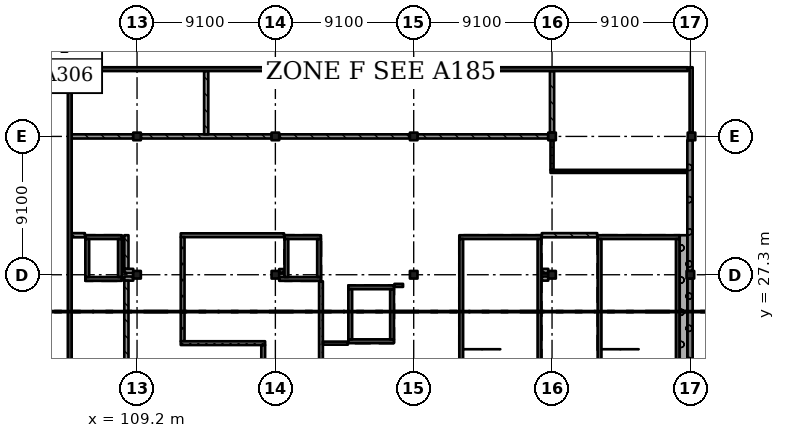
"""IFC4 building model, lengths in metres.
Left out: names, types, materials, properties, quantities, classifications, styles, units other than length and angle.
Written with IfcOpenShell. Run it as: python <this file> out.ifc"""

import sys

from ifc_helpers import new_model, si_unit, direction, frame, frame_2d, origin, origin_2d, place, context, subcontext, project, spatial, rectangle, extrude, element, fill, save


model = new_model("IFC4")
c1 = context("Model", 3, precision=1e-05, world=origin(), true_north=direction((0.0, 1.0)))
c2 = subcontext(c1, "Body", "Model", "MODEL_VIEW")
j1 = project(units=[si_unit("LENGTHUNIT", "METRE"), si_unit("PLANEANGLEUNIT", "RADIAN")], contexts=[c1])
p1 = place(None, origin())
s1 = spatial("IfcSite", under=j1, at=p1, CompositionType="ELEMENT")
p2 = place(p1, origin())
s2 = spatial("IfcBuilding", under=s1, at=p2, CompositionType="ELEMENT")
p3 = place(p2, frame((0.0, 0.0, 29.12)))
s3 = spatial("IfcBuildingStorey", under=s2, at=p3, CompositionType="ELEMENT", Elevation=29.12)
for number, where, z_axis, x_axis in (
    (1, (109.2, 27.3, 0.0), (0.0, 0.0, 1.0), (1.0, 0.0, 0.0)),
    (2, (109.2, 36.4, 0.0), (0.0, 0.0, 1.0), (1.0, 0.0, 0.0)),
    (3, (118.3, 27.3, 0.0), (0.0, 0.0, 1.0), (1.0, 0.0, 0.0)),
    (4, (118.3, 36.4, 0.0), (0.0, 0.0, 1.0), (1.0, 0.0, 0.0)),
    (5, (127.4, 27.3, 0.0), (0.0, 0.0, 1.0), (1.0, 0.0, 0.0)),
    (6, (127.4, 36.4, 0.0), (0.0, 0.0, 1.0), (1.0, 0.0, 0.0)),
    (7, (136.5, 27.3, 0.0), (0.0, 0.0, 1.0), (1.0, 0.0, 0.0)),
    (8, (136.5, 36.4, 0.0), (0.0, 0.0, 1.0), (1.0, 0.0, 0.0)),
    (9, (145.6, 27.3, 0.0), (0.0, 0.0, 1.0), (1.0, 0.0, 0.0)),
    (10, (145.675, 36.4, 0.0), (0.0, 0.0, 1.0), (1.0, 0.0, 0.0)),
):
    element("IfcColumn", number, at=place(p3, frame(where, z_axis=z_axis, x_axis=x_axis)), inside=s3, PredefinedType="COLUMN", context=c2, shape_type="SweptSolid", body=[
        extrude(rectangle(XDim=0.5, YDim=0.5, at=origin_2d()), origin(), (0.0, 0.0, 1.0), 4.55),
    ])
p4 = place(p3, frame((104.775, 40.95, 0.0), z_axis=(0.0, 0.0, 1.0), x_axis=(0.0, -1.0, 0.0)))
e11 = element("IfcWall", 11, at=p4, inside=s3, PredefinedType="SHEAR", context=c2, shape_type="SweptSolid", body=[
    extrude(rectangle(XDim=40.775, YDim=0.25, at=frame_2d((20.387, 0.0))), origin(), (0.0, 0.0, 1.0), 4.55),
])
p5 = place(p3, frame((104.65, 40.825, 0.0), z_axis=(0.0, 0.0, 1.0), x_axis=(1.0, 0.0, 0.0)))
e12 = element("IfcWall", 12, at=p5, inside=s3, PredefinedType="SHEAR", context=c2, shape_type="SweptSolid", body=[
    extrude(rectangle(XDim=40.775, YDim=0.25, at=frame_2d((20.388, 0.0))), origin(), (0.0, 0.0, 1.0), 4.55),
])
p6 = place(p3, frame((108.2, 27.025, 0.0), z_axis=(0.0, 0.0, 1.0), x_axis=(-1.0, 0.0, 0.0)))
e13 = element("IfcWall", 13, at=p6, inside=s3, PredefinedType="SHEAR", context=c2, shape_type="SweptSolid", body=[
    extrude(rectangle(XDim=2.4, YDim=0.25, at=frame_2d((1.2, 0.0))), origin(), (0.0, 0.0, 1.0), 4.55),
])
p7 = place(p6, frame((0.75, 0.0, 0.0)))
e14 = element("IfcOpeningElement", 14, at=p7, cuts=e13, PredefinedType="OPENING", context=c2, shape_type="SweptSolid", body=[
    extrude(rectangle(XDim=0.9, YDim=2.1, at=frame_2d((0.45, 1.05))), frame((0.0, 0.135, 0.0), z_axis=(0.0, -1.0, 0.0), x_axis=(1.0, 0.0, 0.0)), (0.0, 0.0, 1.0), 0.27),
])
p8 = place(p3, frame((108.2, 29.775, 0.0), z_axis=(0.0, 0.0, 1.0), x_axis=(-1.0, 0.0, 0.0)))
e15 = element("IfcWall", 15, at=p8, inside=s3, PredefinedType="SHEAR", context=c2, shape_type="SweptSolid", body=[
    extrude(rectangle(XDim=2.4, YDim=0.25, at=frame_2d((1.2, 0.0))), origin(), (0.0, 0.0, 1.0), 4.55),
])
for number, where, z_axis, x_axis in (
    (16, (105.925, 29.65, 0.0), (0.0, 0.0, 1.0), (0.0, -1.0, 0.0)),
    (17, (108.075, 29.65, 0.0), (0.0, 0.0, 1.0), (0.0, -1.0, 0.0)),
):
    element("IfcWall", number, at=place(p3, frame(where, z_axis=z_axis, x_axis=x_axis)), inside=s3, PredefinedType="SHEAR", context=c2, shape_type="SweptSolid", body=[
        extrude(rectangle(XDim=2.5, YDim=0.25, at=frame_2d((1.25, 0.0))), origin(), (0.0, 0.0, 1.0), 4.55),
    ])
p9 = place(p3, frame((121.3, 27.025, 0.0), z_axis=(0.0, 0.0, 1.0), x_axis=(-1.0, 0.0, 0.0)))
e18 = element("IfcWall", 18, at=p9, inside=s3, PredefinedType="SHEAR", context=c2, shape_type="SweptSolid", body=[
    extrude(rectangle(XDim=2.75, YDim=0.25, at=frame_2d((1.375, 0.0))), origin(), (0.0, 0.0, 1.0), 4.55),
])
p10 = place(p3, frame((121.3, 29.775, 0.0), z_axis=(0.0, 0.0, 1.0), x_axis=(-1.0, 0.0, 0.0)))
e19 = element("IfcWall", 19, at=p10, inside=s3, PredefinedType="SHEAR", context=c2, shape_type="SweptSolid", body=[
    extrude(rectangle(XDim=2.4, YDim=0.25, at=frame_2d((1.2, 0.0))), origin(), (0.0, 0.0, 1.0), 4.55),
])
p11 = place(p3, frame((119.025, 29.65, 0.0), z_axis=(0.0, 0.0, 1.0), x_axis=(0.0, -1.0, 0.0)))
e20 = element("IfcWall", 20, at=p11, inside=s3, PredefinedType="SHEAR", context=c2, shape_type="SweptSolid", body=[
    extrude(rectangle(XDim=2.5, YDim=0.25, at=frame_2d((1.25, 0.0))), origin(), (0.0, 0.0, 1.0), 4.55),
])
p12 = place(p3, frame((121.175, 29.65, 0.0), z_axis=(0.0, 0.0, 1.0), x_axis=(0.0, -1.0, 0.0)))
e21 = element("IfcWall", 21, at=p12, inside=s3, PredefinedType="SHEAR", context=c2, shape_type="SweptSolid", body=[
    extrude(rectangle(XDim=2.5, YDim=0.25, at=frame_2d((1.25, 0.0))), origin(), (0.0, 0.0, 1.0), 4.55),
])
p13 = place(p12, frame((0.9, 0.0, 0.0)))
e22 = element("IfcOpeningElement", 22, at=p13, cuts=e21, PredefinedType="OPENING", context=c2, shape_type="SweptSolid", body=[
    extrude(rectangle(XDim=0.7, YDim=2.1, at=frame_2d((0.35, 1.05))), frame((0.0, 0.135, 0.0), z_axis=(0.0, -1.0, 0.0), x_axis=(1.0, 0.0, 0.0)), (0.0, 0.0, 1.0), 0.27),
])
p14 = place(p3, frame((126.1, 22.925, 0.0), z_axis=(0.0, 0.0, 1.0), x_axis=(-1.0, 0.0, 0.0)))
e23 = element("IfcWall", 23, at=p14, inside=s3, PredefinedType="SHEAR", context=c2, shape_type="SweptSolid", body=[
    extrude(rectangle(XDim=3.0, YDim=0.25, at=frame_2d((1.5, 0.0))), origin(), (0.0, 0.0, 1.0), 4.55),
])
p15 = place(p14, frame((0.95, 0.0, 0.0)))
e24 = element("IfcOpeningElement", 24, at=p15, cuts=e23, PredefinedType="OPENING", context=c2, shape_type="SweptSolid", body=[
    extrude(rectangle(XDim=1.1, YDim=2.1, at=frame_2d((0.55, 1.05))), frame((0.0, 0.135, 0.0), z_axis=(0.0, -1.0, 0.0), x_axis=(1.0, 0.0, 0.0)), (0.0, 0.0, 1.0), 0.27),
])
p16 = place(p3, frame((126.1, 26.475, 0.0), z_axis=(0.0, 0.0, 1.0), x_axis=(-1.0, 0.0, 0.0)))
e25 = element("IfcWall", 25, at=p16, inside=s3, PredefinedType="SHEAR", context=c2, shape_type="SweptSolid", body=[
    extrude(rectangle(XDim=3.0, YDim=0.25, at=frame_2d((1.5, 0.0))), origin(), (0.0, 0.0, 1.0), 4.55),
])
for number, where, z_axis, x_axis in (
    (26, (123.225, 26.35, 0.0), (0.0, 0.0, 1.0), (0.0, -1.0, 0.0)),
    (27, (125.975, 26.35, 0.0), (0.0, 0.0, 1.0), (0.0, -1.0, 0.0)),
):
    element("IfcWall", number, at=place(p3, frame(where, z_axis=z_axis, x_axis=x_axis)), inside=s3, PredefinedType="SHEAR", context=c2, shape_type="SweptSolid", body=[
        extrude(rectangle(XDim=3.3, YDim=0.25, at=frame_2d((1.65, 0.0))), origin(), (0.0, 0.0, 1.0), 4.55),
    ])
p17 = place(p3, frame((144.9, 29.775, 0.0), z_axis=(0.0, 0.0, 1.0), x_axis=(-1.0, 0.0, 0.0)))
e28 = element("IfcWall", 28, at=p17, inside=s3, PredefinedType="SHEAR", context=c2, shape_type="SweptSolid", body=[
    extrude(rectangle(XDim=5.4, YDim=0.25, at=frame_2d((2.7, 0.0))), origin(), (0.0, 0.0, 1.0), 4.55),
])
for number, where, z_axis, x_axis in (
    (29, (139.625, 29.65, 0.0), (0.0, 0.0, 1.0), (0.0, -1.0, 0.0)),
    (30, (144.775, 29.65, 0.0), (0.0, 0.0, 1.0), (0.0, -1.0, 0.0)),
):
    element("IfcWall", number, at=place(p3, frame(where, z_axis=z_axis, x_axis=x_axis)), inside=s3, PredefinedType="SHEAR", context=c2, shape_type="SweptSolid", body=[
        extrude(rectangle(XDim=9.6, YDim=0.25, at=frame_2d((4.8, 0.0))), origin(), (0.0, 0.0, 1.0), 4.55),
    ])
p18 = place(p3, frame((135.8, 29.775, 0.0), z_axis=(0.0, 0.0, 1.0), x_axis=(-1.0, 0.0, 0.0)))
e31 = element("IfcWall", 31, at=p18, inside=s3, PredefinedType="SHEAR", context=c2, shape_type="SweptSolid", body=[
    extrude(rectangle(XDim=5.4, YDim=0.25, at=frame_2d((2.7, 0.0))), origin(), (0.0, 0.0, 1.0), 4.55),
])
for number, where, z_axis, x_axis in (
    (32, (130.525, 29.65, 0.0), (0.0, 0.0, 1.0), (0.0, -1.0, 0.0)),
    (33, (135.675, 29.65, 0.0), (0.0, 0.0, 1.0), (0.0, -1.0, 0.0)),
):
    element("IfcWall", number, at=place(p3, frame(where, z_axis=z_axis, x_axis=x_axis)), inside=s3, PredefinedType="SHEAR", context=c2, shape_type="SweptSolid", body=[
        extrude(rectangle(XDim=9.6, YDim=0.25, at=frame_2d((4.8, 0.0))), origin(), (0.0, 0.0, 1.0), 4.55),
    ])
p19 = place(p3, frame((145.575, 18.45, 0.0), z_axis=(0.0, 0.0, 1.0), x_axis=(0.0, 1.0, 0.0)))
e34 = element("IfcWall", 34, at=p19, inside=s3, PredefinedType="SOLIDWALL", context=c2, shape_type="SweptSolid", body=[
    extrude(rectangle(XDim=8.6, YDim=0.35, at=frame_2d((4.3, 0.0))), origin(), (0.0, 0.0, 1.0), 4.5),
])
p20 = place(p3, frame((145.575, 27.55, 0.0), z_axis=(0.0, 0.0, 1.0), x_axis=(0.0, 1.0, 0.0)))
e35 = element("IfcWall", 35, at=p20, inside=s3, PredefinedType="SOLIDWALL", context=c2, shape_type="SweptSolid", body=[
    extrude(rectangle(XDim=8.6, YDim=0.35, at=frame_2d((4.3, 0.0))), origin(), (0.0, 0.0, 1.0), 4.5),
])
p21 = place(p3, frame((145.65, 36.65, 0.0), z_axis=(0.0, 0.0, 1.0), x_axis=(0.0, 1.0, 0.0)))
e36 = element("IfcWall", 36, at=p21, inside=s3, PredefinedType="SOLIDWALL", context=c2, shape_type="SweptSolid", body=[
    extrude(rectangle(XDim=4.3, YDim=0.2, at=frame_2d((2.15, 0.0))), origin(), (0.0, 0.0, 1.0), 4.5),
])
p22 = place(p21, frame((0.65, 0.0, 0.6)))
e37 = element("IfcOpeningElement", 37, at=p22, cuts=e36, PredefinedType="OPENING", context=c2, shape_type="SweptSolid", body=[
    extrude(rectangle(XDim=3.0, YDim=3.0, at=frame_2d((1.5, 1.5))), frame((0.0, 0.11, 0.0), z_axis=(0.0, -1.0, 0.0), x_axis=(1.0, 0.0, 0.0)), (0.0, 0.0, 1.0), 0.22),
])
p23 = place(p3, frame((145.15, 19.8, 0.0), z_axis=(0.0, 0.0, 1.0), x_axis=(0.0, 1.0, 0.0)))
e38 = element("IfcWall", 38, at=p23, inside=s3, PredefinedType="SOLIDWALL", context=c2, shape_type="SweptSolid", body=[
    extrude(rectangle(XDim=10.1, YDim=0.5, at=frame_2d((5.05, 0.0))), origin(), (0.0, 0.0, 1.0), 4.55),
])
p24 = place(p3, frame((104.9, 29.9, 0.0), z_axis=(0.0, 0.0, 1.0), x_axis=(1.0, 0.0, 0.0)))
e39 = element("IfcWall", 39, at=p24, inside=s3, PredefinedType="SOLIDWALL", context=c2, shape_type="SweptSolid", body=[
    extrude(rectangle(XDim=0.87, YDim=0.275, at=frame_2d((0.435, 0.0))), origin(), (0.0, 0.0, 1.0), 3.88),
])
p25 = place(p3, frame((108.363, 27.05, 0.0), z_axis=(0.0, 0.0, 1.0), x_axis=(1.0, 0.0, 0.0)))
e40 = element("IfcWall", 40, at=p25, inside=s3, PredefinedType="SOLIDWALL", context=c2, shape_type="SweptSolid", body=[
    extrude(rectangle(XDim=0.587, YDim=0.275, at=frame_2d((0.294, 0.0))), origin(), (0.0, 0.0, 1.0), 3.88),
])
p26 = place(p3, frame((108.5, 19.938, 0.0), z_axis=(0.0, 0.0, 1.0), x_axis=(0.0, 1.0, 0.0)))
e41 = element("IfcWall", 41, at=p26, inside=s3, PredefinedType="SOLIDWALL", context=c2, shape_type="SweptSolid", body=[
    extrude(rectangle(XDim=6.975, YDim=0.275, at=frame_2d((3.488, 0.0))), origin(), (0.0, 0.0, 1.0), 3.88),
])
p27 = place(p3, frame((108.5, 27.688, 0.0), z_axis=(0.0, 0.0, 1.0), x_axis=(0.0, 1.0, 0.0)))
e42 = element("IfcWall", 42, at=p27, inside=s3, PredefinedType="SOLIDWALL", context=c2, shape_type="SweptSolid", body=[
    extrude(rectangle(XDim=2.212, YDim=0.275, at=frame_2d((1.106, 0.0))), origin(), (0.0, 0.0, 1.0), 3.88),
])
p28 = place(p3, frame((108.95, 27.55, 0.0), z_axis=(0.0, 0.0, 1.0), x_axis=(-1.0, 0.0, 0.0)))
e43 = element("IfcWall", 43, at=p28, inside=s3, PredefinedType="SOLIDWALL", context=c2, shape_type="SweptSolid", body=[
    extrude(rectangle(XDim=0.587, YDim=0.275, at=frame_2d((0.294, 0.0))), origin(), (0.0, 0.0, 1.0), 3.88),
])
p29 = place(p3, frame((108.95, 36.4, 0.0), z_axis=(0.0, 0.0, 1.0), x_axis=(-1.0, 0.0, 0.0)))
e44 = element("IfcWall", 44, at=p29, inside=s3, PredefinedType="SOLIDWALL", context=c2, shape_type="SweptSolid", body=[
    extrude(rectangle(XDim=4.05, YDim=0.275, at=frame_2d((2.025, 0.0))), origin(), (0.0, 0.0, 1.0), 3.88),
])
p30 = place(p3, frame((112.075, 29.9, 0.0), z_axis=(0.0, 0.0, 1.0), x_axis=(1.0, 0.0, 0.0)))
e45 = element("IfcWall", 45, at=p30, inside=s3, PredefinedType="SOLIDWALL", context=c2, shape_type="SweptSolid", body=[
    extrude(rectangle(XDim=6.795, YDim=0.25, at=frame_2d((3.397, 0.0))), origin(), (0.0, 0.0, 1.0), 3.88),
])
p31 = place(p3, frame((112.2, 22.925, 0.0), z_axis=(0.0, 0.0, 1.0), x_axis=(0.0, 1.0, 0.0)))
e46 = element("IfcWall", 46, at=p31, inside=s3, PredefinedType="SOLIDWALL", context=c2, shape_type="SweptSolid", body=[
    extrude(rectangle(XDim=6.85, YDim=0.25, at=frame_2d((3.425, 0.0))), origin(), (0.0, 0.0, 1.0), 3.88),
])
p32 = place(p3, frame((109.45, 36.4, 0.0), z_axis=(0.0, 0.0, 1.0), x_axis=(1.0, 0.0, 0.0)))
e47 = element("IfcWall", 47, at=p32, inside=s3, PredefinedType="SOLIDWALL", context=c2, shape_type="SweptSolid", body=[
    extrude(rectangle(XDim=8.6, YDim=0.275, at=frame_2d((4.3, 0.0))), origin(), (0.0, 0.0, 1.0), 3.88),
])
p33 = place(p32, frame((1.55, 0.0, 0.0)))
e48 = element("IfcOpeningElement", 48, at=p33, cuts=e47, PredefinedType="OPENING", context=c2, shape_type="SweptSolid", body=[
    extrude(rectangle(XDim=1.2, YDim=2.4, at=frame_2d((0.6, 1.2))), frame((0.0, 0.147, 0.0), z_axis=(0.0, -1.0, 0.0), x_axis=(1.0, 0.0, 0.0)), (0.0, 0.0, 1.0), 0.295),
])
p34 = place(p3, frame((113.75, 36.538, 0.0), z_axis=(0.0, 0.0, 1.0), x_axis=(0.0, 1.0, 0.0)))
e49 = element("IfcWall", 49, at=p34, inside=s3, PredefinedType="SOLIDWALL", context=c2, shape_type="SweptSolid", body=[
    extrude(rectangle(XDim=4.162, YDim=0.275, at=frame_2d((2.081, 0.0))), origin(), (0.0, 0.0, 1.0), 3.88),
])
p35 = place(p3, frame((117.5, 19.925, 0.0), z_axis=(0.0, 0.0, 1.0), x_axis=(0.0, 1.0, 0.0)))
e50 = element("IfcWall", 50, at=p35, inside=s3, PredefinedType="SOLIDWALL", context=c2, shape_type="SweptSolid", body=[
    extrude(rectangle(XDim=2.75, YDim=0.25, at=frame_2d((1.375, 0.0))), origin(), (0.0, 0.0, 1.0), 3.88),
])
p36 = place(p3, frame((117.625, 22.8, 0.0), z_axis=(0.0, 0.0, 1.0), x_axis=(-1.0, 0.0, 0.0)))
e51 = element("IfcWall", 51, at=p36, inside=s3, PredefinedType="SOLIDWALL", context=c2, shape_type="SweptSolid", body=[
    extrude(rectangle(XDim=5.55, YDim=0.25, at=frame_2d((2.775, 0.0))), origin(), (0.0, 0.0, 1.0), 3.88),
])
p37 = place(p3, frame((118.87, 27.55, 0.0), z_axis=(0.0, 0.0, 1.0), x_axis=(-1.0, 0.0, 0.0)))
e52 = element("IfcWall", 52, at=p37, inside=s3, PredefinedType="SOLIDWALL", context=c2, shape_type="SweptSolid", body=[
    extrude(rectangle(XDim=0.32, YDim=0.25, at=frame_2d((0.16, 0.0))), origin(), (0.0, 0.0, 1.0), 3.88),
])
p38 = place(p3, frame((121.3, 19.925, 0.0), z_axis=(0.0, 0.0, 1.0), x_axis=(0.0, 1.0, 0.0)))
e53 = element("IfcWall", 53, at=p38, inside=s3, PredefinedType="SOLIDWALL", context=c2, shape_type="SweptSolid", body=[
    extrude(rectangle(XDim=6.945, YDim=0.25, at=frame_2d((3.473, 0.0))), origin(), (0.0, 0.0, 1.0), 3.88),
])
p39 = place(p3, frame((121.425, 22.8, 0.0), z_axis=(0.0, 0.0, 1.0), x_axis=(1.0, 0.0, 0.0)))
e54 = element("IfcWall", 54, at=p39, inside=s3, PredefinedType="PARTITIONING", context=c2, shape_type="SweptSolid", body=[
    extrude(rectangle(XDim=1.645, YDim=0.2, at=frame_2d((0.823, 0.0))), origin(), (0.0, 0.0, 1.0), 3.88),
])
p40 = place(p3, frame((126.13, 26.6, 0.0), z_axis=(0.0, 0.0, 1.0), x_axis=(1.0, 0.0, 0.0)))
e55 = element("IfcWall", 55, at=p40, inside=s3, PredefinedType="PARTITIONING", context=c2, shape_type="SweptSolid", body=[
    extrude(rectangle(XDim=0.57, YDim=0.2, at=frame_2d((0.285, 0.0))), origin(), (0.0, 0.0, 1.0), 3.88),
])
p41 = place(p3, frame((127.15, 36.4, 0.0), z_axis=(0.0, 0.0, 1.0), x_axis=(-1.0, 0.0, 0.0)))
e56 = element("IfcWall", 56, at=p41, inside=s3, PredefinedType="SOLIDWALL", context=c2, shape_type="SweptSolid", body=[
    extrude(rectangle(XDim=8.6, YDim=0.275, at=frame_2d((4.3, 0.0))), origin(), (0.0, 0.0, 1.0), 3.88),
])
p42 = place(p41, frame((3.75, 0.0, 0.0)))
e57 = element("IfcOpeningElement", 57, at=p42, cuts=e56, PredefinedType="OPENING", context=c2, shape_type="SweptSolid", body=[
    extrude(rectangle(XDim=1.2, YDim=2.4, at=frame_2d((0.6, 1.2))), frame((0.0, 0.147, 0.0), z_axis=(0.0, -1.0, 0.0), x_axis=(1.0, 0.0, 0.0)), (0.0, 0.0, 1.0), 0.295),
])
p43 = place(p3, frame((135.83, 27.05, 0.0), z_axis=(0.0, 0.0, 1.0), x_axis=(1.0, 0.0, 0.0)))
e58 = element("IfcWall", 58, at=p43, inside=s3, PredefinedType="SOLIDWALL", context=c2, shape_type="SweptSolid", body=[
    extrude(rectangle(XDim=0.42, YDim=0.275, at=frame_2d((0.21, 0.0))), origin(), (0.0, 0.0, 1.0), 3.88),
])
p44 = place(p3, frame((135.83, 29.9, 0.0), z_axis=(0.0, 0.0, 1.0), x_axis=(1.0, 0.0, 0.0)))
e59 = element("IfcWall", 59, at=p44, inside=s3, PredefinedType="SOLIDWALL", context=c2, shape_type="SweptSolid", body=[
    extrude(rectangle(XDim=3.64, YDim=0.275, at=frame_2d((1.82, 0.0))), origin(), (0.0, 0.0, 1.0), 3.88),
])
p45 = place(p3, frame((136.25, 27.55, 0.0), z_axis=(0.0, 0.0, 1.0), x_axis=(-1.0, 0.0, 0.0)))
e60 = element("IfcWall", 60, at=p45, inside=s3, PredefinedType="SOLIDWALL", context=c2, shape_type="SweptSolid", body=[
    extrude(rectangle(XDim=0.42, YDim=0.275, at=frame_2d((0.21, 0.0))), origin(), (0.0, 0.0, 1.0), 3.88),
])
p46 = place(p3, frame((136.25, 36.4, 0.0), z_axis=(0.0, 0.0, 1.0), x_axis=(-1.0, 0.0, 0.0)))
e61 = element("IfcWall", 61, at=p46, inside=s3, PredefinedType="SOLIDWALL", context=c2, shape_type="SweptSolid", body=[
    extrude(rectangle(XDim=8.6, YDim=0.275, at=frame_2d((4.3, 0.0))), origin(), (0.0, 0.0, 1.0), 3.88),
])
p47 = place(p3, frame((136.4, 34.1, 0.0), z_axis=(0.0, 0.0, 1.0), x_axis=(1.0, 0.0, 0.0)))
e62 = element("IfcWall", 62, at=p47, inside=s3, PredefinedType="PARTITIONING", context=c2, shape_type="SweptSolid", body=[
    extrude(rectangle(XDim=9.0, YDim=0.2, at=frame_2d((4.5, 0.0))), origin(), (0.0, 0.0, 1.0), 3.88),
])
p48 = place(p47, frame((1.05, 0.0, 0.0)))
e63 = element("IfcOpeningElement", 63, at=p48, cuts=e62, PredefinedType="OPENING", context=c2, shape_type="SweptSolid", body=[
    extrude(rectangle(XDim=2.4, YDim=2.4, at=frame_2d((1.2, 1.2))), frame((0.0, 0.11, 0.0), z_axis=(0.0, -1.0, 0.0), x_axis=(1.0, 0.0, 0.0)), (0.0, 0.0, 1.0), 0.22),
])
p49 = place(p47, frame((5.55, 0.0, 0.0)))
e64 = element("IfcOpeningElement", 64, at=p49, cuts=e62, PredefinedType="OPENING", context=c2, shape_type="SweptSolid", body=[
    extrude(rectangle(XDim=2.4, YDim=2.4, at=frame_2d((1.2, 1.2))), frame((0.0, 0.11, 0.0), z_axis=(0.0, -1.0, 0.0), x_axis=(1.0, 0.0, 0.0)), (0.0, 0.0, 1.0), 0.22),
])
p50 = place(p3, frame((136.5, 36.15, 0.0), z_axis=(0.0, 0.0, 1.0), x_axis=(0.0, -1.0, 0.0)))
e65 = element("IfcWall", 65, at=p50, inside=s3, PredefinedType="PARTITIONING", context=c2, shape_type="SweptSolid", body=[
    extrude(rectangle(XDim=1.95, YDim=0.2, at=frame_2d((0.975, 0.0))), origin(), (0.0, 0.0, 1.0), 3.88),
])
p51 = place(p3, frame((136.5, 40.7, 0.0), z_axis=(0.0, 0.0, 1.0), x_axis=(0.0, -1.0, 0.0)))
e66 = element("IfcWall", 66, at=p51, inside=s3, PredefinedType="SOLIDWALL", context=c2, shape_type="SweptSolid", body=[
    extrude(rectangle(XDim=4.05, YDim=0.275, at=frame_2d((2.025, 0.0))), origin(), (0.0, 0.0, 1.0), 3.88),
])
p52 = place(p22, origin())
e67 = element("IfcWindow", 67, at=p52, inside=s3, PartitioningType="SINGLE_PANEL", PredefinedType="WINDOW", context=c2, shape_type="SweptSolid", body=[
    extrude(rectangle(XDim=3.0, YDim=3.0, at=frame_2d((1.5, 1.5))), frame((0.0, 0.03, 0.0), z_axis=(0.0, -1.0, 0.0), x_axis=(1.0, 0.0, 0.0)), (0.0, 0.0, 1.0), 0.06),
])
fill(e37, e67)
p53 = place(p42, origin())
e68 = element("IfcDoor", 68, at=p53, inside=s3, OperationType="SINGLE_SWING_RIGHT", PredefinedType="DOOR", context=c2, shape_type="SweptSolid", body=[
    extrude(rectangle(XDim=1.2, YDim=2.4, at=frame_2d((0.6, 1.2))), frame((0.0, 0.025, 0.0), z_axis=(0.0, -1.0, 0.0), x_axis=(1.0, 0.0, 0.0)), (0.0, 0.0, 1.0), 0.05),
])
fill(e57, e68)
p54 = place(p33, origin())
e69 = element("IfcDoor", 69, at=p54, inside=s3, OperationType="SINGLE_SWING_RIGHT", PredefinedType="DOOR", context=c2, shape_type="SweptSolid", body=[
    extrude(rectangle(XDim=1.2, YDim=2.4, at=frame_2d((0.6, 1.2))), frame((0.0, 0.025, 0.0), z_axis=(0.0, -1.0, 0.0), x_axis=(1.0, 0.0, 0.0)), (0.0, 0.0, 1.0), 0.05),
])
fill(e48, e69)
p55 = place(p48, origin())
e70 = element("IfcDoor", 70, at=p55, inside=s3, OperationType="DOUBLE_DOOR_SINGLE_SWING", PredefinedType="DOOR", context=c2, shape_type="SweptSolid", body=[
    extrude(rectangle(XDim=2.4, YDim=2.4, at=frame_2d((1.2, 1.2))), frame((0.0, 0.025, 0.0), z_axis=(0.0, -1.0, 0.0), x_axis=(1.0, 0.0, 0.0)), (0.0, 0.0, 1.0), 0.05),
])
fill(e63, e70)
p56 = place(p49, origin())
e71 = element("IfcDoor", 71, at=p56, inside=s3, OperationType="DOUBLE_DOOR_SINGLE_SWING", PredefinedType="DOOR", context=c2, shape_type="SweptSolid", body=[
    extrude(rectangle(XDim=2.4, YDim=2.4, at=frame_2d((1.2, 1.2))), frame((0.0, 0.025, 0.0), z_axis=(0.0, -1.0, 0.0), x_axis=(1.0, 0.0, 0.0)), (0.0, 0.0, 1.0), 0.05),
])
fill(e64, e71)
p57 = place(p7, origin())
e72 = element("IfcDoor", 72, at=p57, inside=s3, OperationType="SINGLE_SWING_LEFT", PredefinedType="DOOR", context=c2, shape_type="SweptSolid", body=[
    extrude(rectangle(XDim=0.9, YDim=2.1, at=frame_2d((0.45, 1.05))), frame((0.0, 0.025, 0.0), z_axis=(0.0, -1.0, 0.0), x_axis=(1.0, 0.0, 0.0)), (0.0, 0.0, 1.0), 0.05),
])
fill(e14, e72)
p58 = place(p13, origin())
e73 = element("IfcDoor", 73, at=p58, inside=s3, OperationType="SINGLE_SWING_RIGHT", PredefinedType="DOOR", context=c2, shape_type="SweptSolid", body=[
    extrude(rectangle(XDim=0.7, YDim=2.1, at=frame_2d((0.35, 1.05))), frame((0.0, 0.025, 0.0), z_axis=(0.0, -1.0, 0.0), x_axis=(1.0, 0.0, 0.0)), (0.0, 0.0, 1.0), 0.05),
])
fill(e22, e73)
p59 = place(p15, origin())
e74 = element("IfcDoor", 74, at=p59, inside=s3, OperationType="DOUBLE_DOOR_SLIDING", PredefinedType="DOOR", context=c2, shape_type="SweptSolid", body=[
    extrude(rectangle(XDim=1.1, YDim=2.1, at=frame_2d((0.55, 1.05))), frame((0.0, 0.025, 0.0), z_axis=(0.0, -1.0, 0.0), x_axis=(1.0, 0.0, 0.0)), (0.0, 0.0, 1.0), 0.05),
])
fill(e24, e74)
save(model, sys.argv[1])
